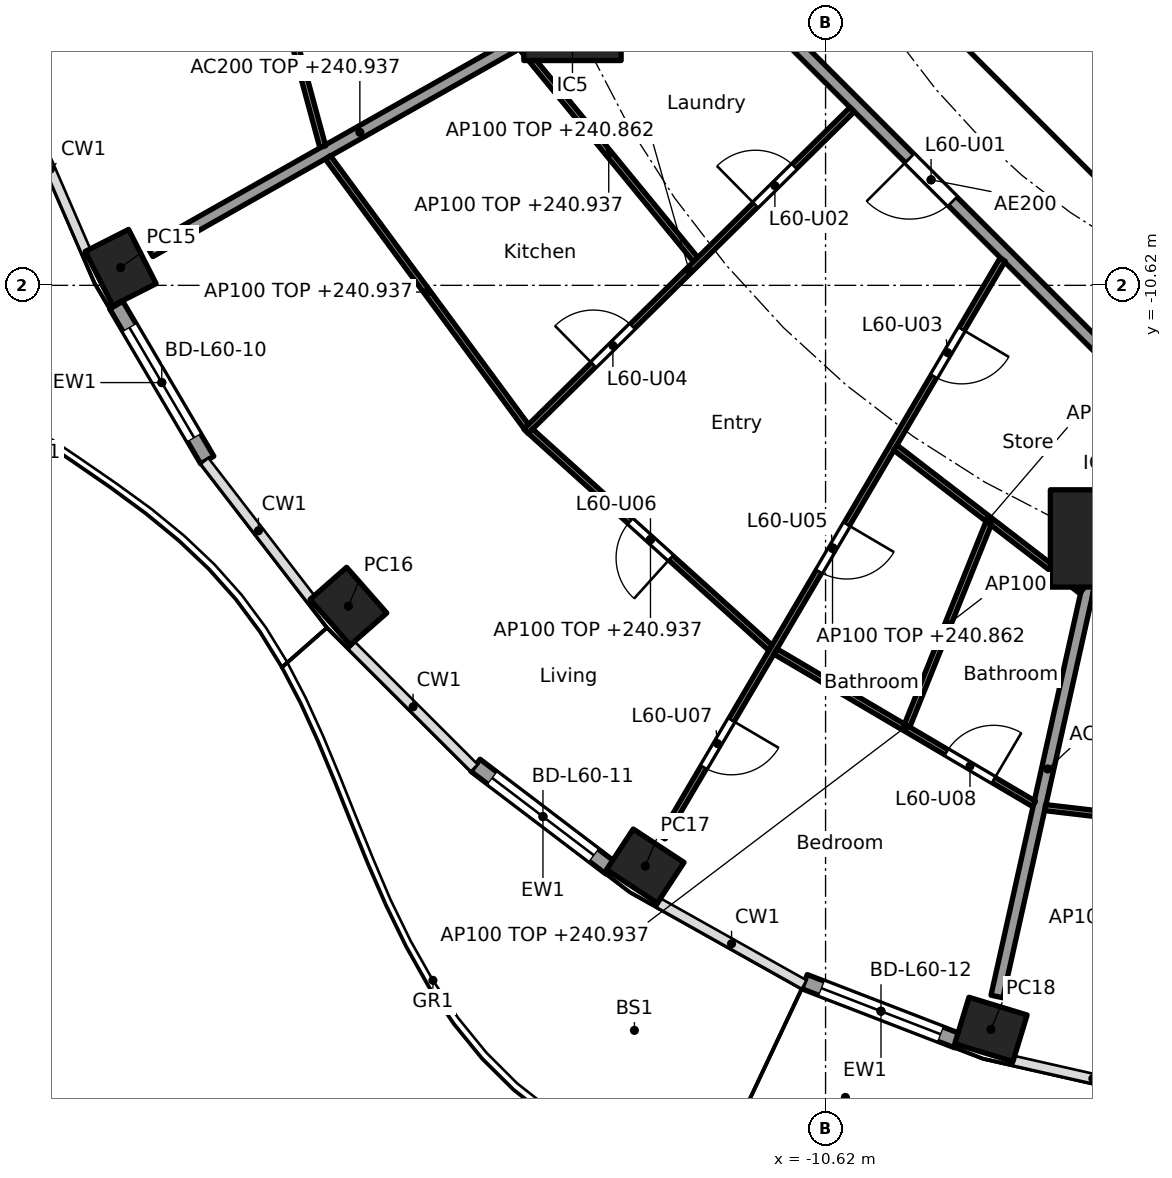
"""IFC4 building model, lengths in metres.
Left out: names, types, materials, properties, quantities, classifications, styles, units other than length and angle.
Written with IfcOpenShell. Run it as: python <this file> out.ifc"""

import sys

from ifc_helpers import new_model, si_unit, direction, frame, frame_2d, origin, origin_2d, place, context, subcontext, project, spatial, rectangle, hollow_rectangle, extrude, element, fill, save


model = new_model("IFC4")
c1 = context("Model", 3, precision=1e-05, world=origin(), true_north=direction((0.0, 1.0)))
c2 = subcontext(c1, "Body", "Model", "MODEL_VIEW")
j1 = project(units=[si_unit("LENGTHUNIT", "METRE"), si_unit("PLANEANGLEUNIT", "RADIAN")], contexts=[c1])
p1 = place(None, origin())
s1 = spatial("IfcSite", under=j1, at=p1, CompositionType="ELEMENT")
p2 = place(p1, origin())
s2 = spatial("IfcBuilding", under=s1, at=p2, CompositionType="ELEMENT")
p3 = place(p2, frame((0.0, 0.0, 238.1)))
s3 = spatial("IfcBuildingStorey", under=s2, at=p3, CompositionType="ELEMENT", Elevation=238.1)
for number, where, z_axis, x_axis in (
    (1, (-22.212, -10.327, 0.0), (0.0, 0.0, 1.0), (0.452, -0.892, 0.0)),
    (2, (-18.467, -15.896, 0.0), (0.0, 0.0, 1.0), (0.66, -0.751, 0.0)),
    (3, (-13.585, -20.17, 0.0), (0.0, 0.0, 1.0), (0.836, -0.549, 0.0)),
    (4, (-7.9, -22.856, 0.0), (0.0, 0.0, 1.0), (0.957, -0.292, 0.0)),
):
    element("IfcColumn", number, at=place(p3, frame(where, z_axis=z_axis, x_axis=x_axis)), inside=s3, PredefinedType="COLUMN", context=c2, shape_type="SweptSolid", body=[
        extrude(hollow_rectangle(XDim=1.0, YDim=0.8, WallThickness=0.032, at=origin_2d()), origin(), (0.0, 0.0, 1.0), 3.7),
    ])
for number, where, z_axis, x_axis in (
    (5, (-14.782, -6.123, 0.0), (0.0, 0.0, 1.0), (1.0, 0.0, 0.0)),
    (6, (-6.123, -14.782, 0.0), (0.0, 0.0, 1.0), (1.0, 0.0, 0.0)),
):
    element("IfcColumn", number, at=place(p3, frame(where, z_axis=z_axis, x_axis=x_axis)), inside=s3, PredefinedType="COLUMN", context=c2, shape_type="SweptSolid", body=[
        extrude(rectangle(XDim=1.6, YDim=1.6, at=origin_2d()), origin(), (0.0, 0.0, 1.0), 3.7),
    ])
p4 = place(p3, frame((-20.788, -13.493, 0.0), z_axis=(0.0, 0.0, 1.0), x_axis=(-0.506294090973, 0.862360883532, 0.0)))
e7 = element("IfcWall", 7, at=p4, inside=s3, PredefinedType="SOLIDWALL", context=c2, shape_type="SweptSolid", body=[
    extrude(rectangle(XDim=2.955, YDim=0.25, at=frame_2d((1.477, 0.0))), origin(), (0.0, 0.0, 1.0), 3.44),
])
p5 = place(p4, frame((0.427, 0.0, 0.0)))
e8 = element("IfcOpeningElement", 8, at=p5, cuts=e7, PredefinedType="OPENING", context=c2, shape_type="SweptSolid", body=[
    extrude(rectangle(XDim=2.1, YDim=2.4, at=frame_2d((1.05, 1.2))), frame((0.0, 0.135, 0.0), z_axis=(0.0, -1.0, 0.0), x_axis=(1.0, 0.0, 0.0)), (0.0, 0.0, 1.0), 0.27),
])
p6 = place(p3, frame((-14.157, -20.201, 0.0), z_axis=(0.0, 0.0, 1.0), x_axis=(-0.795990084031, 0.60530966135, 0.0)))
e9 = element("IfcWall", 9, at=p6, inside=s3, PredefinedType="SOLIDWALL", context=c2, shape_type="SweptSolid", body=[
    extrude(rectangle(XDim=2.789, YDim=0.25, at=frame_2d((1.394, 0.0))), origin(), (0.0, 0.0, 1.0), 3.44),
])
p7 = place(p6, frame((0.344, 0.0, 0.0)))
e10 = element("IfcOpeningElement", 10, at=p7, cuts=e9, PredefinedType="OPENING", context=c2, shape_type="SweptSolid", body=[
    extrude(rectangle(XDim=2.1, YDim=2.4, at=frame_2d((1.05, 1.2))), frame((0.0, 0.135, 0.0), z_axis=(0.0, -1.0, 0.0), x_axis=(1.0, 0.0, 0.0)), (0.0, 0.0, 1.0), 0.27),
])
p8 = place(p3, frame((-8.451, -23.042, 0.0), z_axis=(0.0, 0.0, 1.0), x_axis=(-0.932826499224, 0.360325855782, 0.0)))
e11 = element("IfcWall", 11, at=p8, inside=s3, PredefinedType="SOLIDWALL", context=c2, shape_type="SweptSolid", body=[
    extrude(rectangle(XDim=2.696, YDim=0.25, at=frame_2d((1.348, 0.0))), origin(), (0.0, 0.0, 1.0), 3.44),
])
p9 = place(p8, frame((0.298, 0.0, 0.0)))
e12 = element("IfcOpeningElement", 12, at=p9, cuts=e11, PredefinedType="OPENING", context=c2, shape_type="SweptSolid", body=[
    extrude(rectangle(XDim=2.1, YDim=2.4, at=frame_2d((1.05, 1.2))), frame((0.0, 0.135, 0.0), z_axis=(0.0, -1.0, 0.0), x_axis=(1.0, 0.0, 0.0)), (0.0, 0.0, 1.0), 0.27),
])
p10 = place(p3, frame((-9.988, -4.613, 0.0), z_axis=(0.0, 0.0, 1.0), x_axis=(0.707106781187, -0.707106781187, 0.0)))
e13 = element("IfcWall", 13, at=p10, inside=s3, PredefinedType="SHEAR", context=c2, shape_type="SweptSolid", body=[
    extrude(rectangle(XDim=7.602, YDim=0.6, at=frame_2d((3.801, 0.0))), origin(), (0.0, 0.0, 1.0), 3.44),
])
p11 = place(p10, frame((6.151, 0.0, 0.0)))
e14 = element("IfcOpeningElement", 14, at=p11, cuts=e13, PredefinedType="OPENING", context=c2, shape_type="SweptSolid", body=[
    extrude(rectangle(XDim=1.1, YDim=2.1, at=frame_2d((0.55, 1.05))), frame((0.0, 0.31, 0.0), z_axis=(0.0, -1.0, 0.0), x_axis=(1.0, 0.0, 0.0)), (0.0, 0.0, 1.0), 0.62),
])
p12 = place(p3, frame((-14.825, -6.148, 0.0), z_axis=(0.0, 0.0, 1.0), x_axis=(-0.870099576105, -0.492875975944, 0.0)))
e15 = element("IfcWall", 15, at=p12, inside=s3, PredefinedType="PARTITIONING", context=c2, shape_type="SweptSolid", body=[
    extrude(rectangle(XDim=7.937, YDim=0.2, at=frame_2d((3.969, 0.0))), origin(), (0.0, 0.0, 1.0), 2.837),
])
p13 = place(p3, frame((-6.134, -14.831, 0.0), z_axis=(0.0, 0.0, 1.0), x_axis=(-0.217500172543, -0.976060282433, 0.0)))
e16 = element("IfcWall", 16, at=p13, inside=s3, PredefinedType="PARTITIONING", context=c2, shape_type="SweptSolid", body=[
    extrude(rectangle(XDim=7.668, YDim=0.2, at=frame_2d((3.834, 0.0))), origin(), (0.0, 0.0, 1.0), 2.837),
])
p14 = place(p3, frame((-12.635, -5.134, 0.0), z_axis=(0.0, 0.0, 1.0), x_axis=(0.707106781187, -0.707106781187, 0.0)))
e17 = element("IfcWall", 17, at=p14, inside=s3, PredefinedType="PARTITIONING", context=c2, shape_type="SweptSolid", body=[
    extrude(rectangle(XDim=10.609, YDim=0.2, at=frame_2d((5.305, 0.0))), origin(), (0.0, 0.0, 1.0), 3.44),
])
p15 = place(p14, frame((4.804, 0.0, 0.0)))
e18 = element("IfcOpeningElement", 18, at=p15, cuts=e17, PredefinedType="OPENING", context=c2, shape_type="SweptSolid", body=[
    extrude(rectangle(XDim=1.0, YDim=2.1, at=frame_2d((0.5, 1.05))), frame((0.0, 0.11, 0.0), z_axis=(0.0, -1.0, 0.0), x_axis=(1.0, 0.0, 0.0)), (0.0, 0.0, 1.0), 0.22),
])
p16 = place(p3, frame((-20.292, -3.17, 0.0), z_axis=(0.0, 0.0, 1.0), x_axis=(0.26187906236, -0.965100697698, 0.0)))
e19 = element("IfcWall", 19, at=p16, inside=s3, PredefinedType="PARTITIONING", context=c2, shape_type="SweptSolid", body=[
    extrude(rectangle(XDim=5.356, YDim=0.1, at=frame_2d((2.678, 0.0))), origin(), (0.0, 0.0, 1.0), 2.837),
])
p17 = place(p16, frame((2.228, 0.0, 0.0)))
e20 = element("IfcOpeningElement", 20, at=p17, cuts=e19, PredefinedType="OPENING", context=c2, shape_type="SweptSolid", body=[
    extrude(rectangle(XDim=0.9, YDim=2.1, at=frame_2d((0.45, 1.05))), frame((0.0, 0.06, 0.0), z_axis=(0.0, -1.0, 0.0), x_axis=(1.0, 0.0, 0.0)), (0.0, 0.0, 1.0), 0.12),
])
p18 = place(p3, frame((-15.616, -6.708, 0.0), z_axis=(0.0, 0.0, 1.0), x_axis=(0.634074410447, -0.77327203623, 0.0)))
e21 = element("IfcWall", 21, at=p18, inside=s3, PredefinedType="PARTITIONING", context=c2, shape_type="SweptSolid", body=[
    extrude(rectangle(XDim=4.511, YDim=0.1, at=frame_2d((2.255, 0.0))), origin(), (0.0, 0.0, 1.0), 2.837),
])
p19 = place(p3, frame((-18.804, -8.516, 0.0), z_axis=(0.0, 0.0, 1.0), x_axis=(0.593233851441, -0.80503018422, 0.0)))
e22 = element("IfcWall", 22, at=p19, inside=s3, PredefinedType="PARTITIONING", context=c2, shape_type="SweptSolid", body=[
    extrude(rectangle(XDim=5.502, YDim=0.1, at=frame_2d((2.751, 0.0))), origin(), (0.0, 0.0, 1.0), 2.837),
])
p20 = place(p3, frame((-10.183, -7.728, 0.0), z_axis=(0.0, 0.0, 1.0), x_axis=(-0.711869910979, -0.702311348223, 0.0)))
e23 = element("IfcWall", 23, at=p20, inside=s3, PredefinedType="PARTITIONING", context=c2, shape_type="SweptSolid", body=[
    extrude(rectangle(XDim=7.535, YDim=0.1, at=frame_2d((3.767, 0.0))), origin(), (0.0, 0.0, 1.0), 2.762),
])
p21 = place(p20, frame((1.335, 0.0, 0.0)))
e24 = element("IfcOpeningElement", 24, at=p21, cuts=e23, PredefinedType="OPENING", context=c2, shape_type="SweptSolid", body=[
    extrude(rectangle(XDim=0.9, YDim=2.1, at=frame_2d((0.45, 1.05))), frame((0.0, 0.06, 0.0), z_axis=(0.0, -1.0, 0.0), x_axis=(1.0, 0.0, 0.0)), (0.0, 0.0, 1.0), 0.12),
])
p22 = place(p20, frame((5.077, 0.0, 0.0)))
e25 = element("IfcOpeningElement", 25, at=p22, cuts=e23, PredefinedType="OPENING", context=c2, shape_type="SweptSolid", body=[
    extrude(rectangle(XDim=0.9, YDim=2.1, at=frame_2d((0.45, 1.05))), frame((0.0, 0.06, 0.0), z_axis=(0.0, -1.0, 0.0), x_axis=(1.0, 0.0, 0.0)), (0.0, 0.0, 1.0), 0.12),
])
p23 = place(p3, frame((-15.474, -13.019, 0.0), z_axis=(0.0, 0.0, 1.0), x_axis=(0.742348572616, -0.670013878017, 0.0)))
e26 = element("IfcWall", 26, at=p23, inside=s3, PredefinedType="PARTITIONING", context=c2, shape_type="SweptSolid", body=[
    extrude(rectangle(XDim=5.319, YDim=0.1, at=frame_2d((2.66, 0.0))), origin(), (0.0, 0.0, 1.0), 2.837),
])
p24 = place(p23, frame((2.21, 0.0, 0.0)))
e27 = element("IfcOpeningElement", 27, at=p24, cuts=e26, PredefinedType="OPENING", context=c2, shape_type="SweptSolid", body=[
    extrude(rectangle(XDim=0.9, YDim=2.1, at=frame_2d((0.45, 1.05))), frame((0.0, 0.06, 0.0), z_axis=(0.0, -1.0, 0.0), x_axis=(1.0, 0.0, 0.0)), (0.0, 0.0, 1.0), 0.12),
])
p25 = place(p3, frame((-7.709, -10.198, 0.0), z_axis=(0.0, 0.0, 1.0), x_axis=(-0.507355901053, -0.8617366127, 0.0)))
e28 = element("IfcWall", 28, at=p25, inside=s3, PredefinedType="PARTITIONING", context=c2, shape_type="SweptSolid", body=[
    extrude(rectangle(XDim=11.025, YDim=0.1, at=frame_2d((5.512, 0.0))), origin(), (0.0, 0.0, 1.0), 2.762),
])
p26 = place(p25, frame((1.326, 0.0, 0.0)))
e29 = element("IfcOpeningElement", 29, at=p26, cuts=e28, PredefinedType="OPENING", context=c2, shape_type="SweptSolid", body=[
    extrude(rectangle(XDim=0.9, YDim=2.1, at=frame_2d((0.45, 1.05))), frame((0.0, 0.06, 0.0), z_axis=(0.0, -1.0, 0.0), x_axis=(1.0, 0.0, 0.0)), (0.0, 0.0, 1.0), 0.12),
])
p27 = place(p25, frame((5.05, 0.0, 0.0)))
e30 = element("IfcOpeningElement", 30, at=p27, cuts=e28, PredefinedType="OPENING", context=c2, shape_type="SweptSolid", body=[
    extrude(rectangle(XDim=0.9, YDim=2.1, at=frame_2d((0.45, 1.05))), frame((0.0, 0.06, 0.0), z_axis=(0.0, -1.0, 0.0), x_axis=(1.0, 0.0, 0.0)), (0.0, 0.0, 1.0), 0.12),
])
p28 = place(p25, frame((8.787, 0.0, 0.0)))
e31 = element("IfcOpeningElement", 31, at=p28, cuts=e28, PredefinedType="OPENING", context=c2, shape_type="SweptSolid", body=[
    extrude(rectangle(XDim=0.9, YDim=2.1, at=frame_2d((0.45, 1.05))), frame((0.0, 0.06, 0.0), z_axis=(0.0, -1.0, 0.0), x_axis=(1.0, 0.0, 0.0)), (0.0, 0.0, 1.0), 0.12),
])
p29 = place(p3, frame((-9.471, -13.289, 0.0), z_axis=(0.0, 0.0, 1.0), x_axis=(0.792227074489, -0.610226402614, 0.0)))
e32 = element("IfcWall", 32, at=p29, inside=s3, PredefinedType="PARTITIONING", context=c2, shape_type="SweptSolid", body=[
    extrude(rectangle(XDim=3.866, YDim=0.1, at=frame_2d((1.933, 0.0))), origin(), (0.0, 0.0, 1.0), 2.837),
])
p30 = place(p3, frame((-11.445, -16.641, 0.0), z_axis=(0.0, 0.0, 1.0), x_axis=(0.861568986754, -0.507640503766, 0.0)))
e33 = element("IfcWall", 33, at=p30, inside=s3, PredefinedType="PARTITIONING", context=c2, shape_type="SweptSolid", body=[
    extrude(rectangle(XDim=4.935, YDim=0.1, at=frame_2d((2.467, 0.0))), origin(), (0.0, 0.0, 1.0), 2.837),
])
p31 = place(p30, frame((3.264, 0.0, 0.0)))
e34 = element("IfcOpeningElement", 34, at=p31, cuts=e33, PredefinedType="OPENING", context=c2, shape_type="SweptSolid", body=[
    extrude(rectangle(XDim=0.9, YDim=2.1, at=frame_2d((0.45, 1.05))), frame((0.0, 0.06, 0.0), z_axis=(0.0, -1.0, 0.0), x_axis=(1.0, 0.0, 0.0)), (0.0, 0.0, 1.0), 0.12),
])
p32 = place(p3, frame((-7.939, -14.531, 0.0), z_axis=(0.0, 0.0, 1.0), x_axis=(-0.373254758443, -0.927728885666, 0.0)))
e35 = element("IfcWall", 35, at=p32, inside=s3, PredefinedType="PARTITIONING", context=c2, shape_type="SweptSolid", body=[
    extrude(rectangle(XDim=3.589, YDim=0.1, at=frame_2d((1.794, 0.0))), origin(), (0.0, 0.0, 1.0), 3.44),
])
p33 = place(p3, frame((-6.23, -15.717, 0.0), z_axis=(0.0, 0.0, 1.0), x_axis=(0.996784770134, -0.080125663978, 0.0)))
e36 = element("IfcWall", 36, at=p33, inside=s3, PredefinedType="PARTITIONING", context=c2, shape_type="SweptSolid", body=[
    extrude(rectangle(XDim=4.54, YDim=0.1, at=frame_2d((2.27, 0.0))), origin(), (0.0, 0.0, 1.0), 2.837),
])
p34 = place(p33, frame((1.795, 0.0, 0.0)))
e37 = element("IfcOpeningElement", 37, at=p34, cuts=e36, PredefinedType="OPENING", context=c2, shape_type="SweptSolid", body=[
    extrude(rectangle(XDim=0.9, YDim=2.1, at=frame_2d((0.45, 1.05))), frame((0.0, 0.06, 0.0), z_axis=(0.0, -1.0, 0.0), x_axis=(1.0, 0.0, 0.0)), (0.0, 0.0, 1.0), 0.12),
])
p35 = place(p3, frame((-7.008, -19.209, 0.0), z_axis=(0.0, 0.0, 1.0), x_axis=(0.993173459887, -0.116646811258, 0.0)))
e38 = element("IfcWall", 38, at=p35, inside=s3, PredefinedType="PARTITIONING", context=c2, shape_type="SweptSolid", body=[
    extrude(rectangle(XDim=5.318, YDim=0.1, at=frame_2d((2.659, 0.0))), origin(), (0.0, 0.0, 1.0), 2.837),
])
p36 = place(p35, frame((2.184, 0.0, 0.0)))
e39 = element("IfcOpeningElement", 39, at=p36, cuts=e38, PredefinedType="OPENING", context=c2, shape_type="SweptSolid", body=[
    extrude(rectangle(XDim=0.9, YDim=2.1, at=frame_2d((0.45, 1.05))), frame((0.0, 0.06, 0.0), z_axis=(0.0, -1.0, 0.0), x_axis=(1.0, 0.0, 0.0)), (0.0, 0.0, 1.0), 0.12),
])
p37 = place(p5, origin())
e40 = element("IfcDoor", 40, at=p37, inside=s3, OperationType="SLIDING_TO_LEFT", PredefinedType="DOOR", context=c2, shape_type="SweptSolid", body=[
    extrude(rectangle(XDim=2.1, YDim=2.4, at=frame_2d((1.05, 1.2))), frame((0.0, 0.025, 0.0), z_axis=(0.0, -1.0, 0.0), x_axis=(1.0, 0.0, 0.0)), (0.0, 0.0, 1.0), 0.05),
])
fill(e8, e40)
p38 = place(p7, origin())
e41 = element("IfcDoor", 41, at=p38, inside=s3, OperationType="SLIDING_TO_LEFT", PredefinedType="DOOR", context=c2, shape_type="SweptSolid", body=[
    extrude(rectangle(XDim=2.1, YDim=2.4, at=frame_2d((1.05, 1.2))), frame((0.0, 0.025, 0.0), z_axis=(0.0, -1.0, 0.0), x_axis=(1.0, 0.0, 0.0)), (0.0, 0.0, 1.0), 0.05),
])
fill(e10, e41)
p39 = place(p9, origin())
e42 = element("IfcDoor", 42, at=p39, inside=s3, OperationType="SLIDING_TO_LEFT", PredefinedType="DOOR", context=c2, shape_type="SweptSolid", body=[
    extrude(rectangle(XDim=2.1, YDim=2.4, at=frame_2d((1.05, 1.2))), frame((0.0, 0.025, 0.0), z_axis=(0.0, -1.0, 0.0), x_axis=(1.0, 0.0, 0.0)), (0.0, 0.0, 1.0), 0.05),
])
fill(e12, e42)
p40 = place(p15, frame((1.0, 0.0, 0.0), x_axis=(-1.0, 0.0, 0.0)))
e43 = element("IfcDoor", 43, at=p40, inside=s3, OperationType="SINGLE_SWING_RIGHT", PredefinedType="DOOR", context=c2, shape_type="SweptSolid", body=[
    extrude(rectangle(XDim=1.0, YDim=2.1, at=frame_2d((0.5, 1.05))), frame((0.0, 0.025, 0.0), z_axis=(0.0, -1.0, 0.0), x_axis=(1.0, 0.0, 0.0)), (0.0, 0.0, 1.0), 0.05),
])
fill(e18, e43)
p41 = place(p21, frame((0.9, 0.0, 0.0), x_axis=(-1.0, 0.0, 0.0)))
e44 = element("IfcDoor", 44, at=p41, inside=s3, OperationType="SINGLE_SWING_LEFT", PredefinedType="DOOR", context=c2, shape_type="SweptSolid", body=[
    extrude(rectangle(XDim=0.9, YDim=2.1, at=frame_2d((0.45, 1.05))), frame((0.0, 0.025, 0.0), z_axis=(0.0, -1.0, 0.0), x_axis=(1.0, 0.0, 0.0)), (0.0, 0.0, 1.0), 0.05),
])
fill(e24, e44)
p42 = place(p26, origin())
e45 = element("IfcDoor", 45, at=p42, inside=s3, OperationType="SINGLE_SWING_LEFT", PredefinedType="DOOR", context=c2, shape_type="SweptSolid", body=[
    extrude(rectangle(XDim=0.9, YDim=2.1, at=frame_2d((0.45, 1.05))), frame((0.0, 0.025, 0.0), z_axis=(0.0, -1.0, 0.0), x_axis=(1.0, 0.0, 0.0)), (0.0, 0.0, 1.0), 0.05),
])
fill(e29, e45)
p43 = place(p22, frame((0.9, 0.0, 0.0), x_axis=(-1.0, 0.0, 0.0)))
e46 = element("IfcDoor", 46, at=p43, inside=s3, OperationType="SINGLE_SWING_LEFT", PredefinedType="DOOR", context=c2, shape_type="SweptSolid", body=[
    extrude(rectangle(XDim=0.9, YDim=2.1, at=frame_2d((0.45, 1.05))), frame((0.0, 0.025, 0.0), z_axis=(0.0, -1.0, 0.0), x_axis=(1.0, 0.0, 0.0)), (0.0, 0.0, 1.0), 0.05),
])
fill(e25, e46)
p44 = place(p27, origin())
e47 = element("IfcDoor", 47, at=p44, inside=s3, OperationType="SINGLE_SWING_LEFT", PredefinedType="DOOR", context=c2, shape_type="SweptSolid", body=[
    extrude(rectangle(XDim=0.9, YDim=2.1, at=frame_2d((0.45, 1.05))), frame((0.0, 0.025, 0.0), z_axis=(0.0, -1.0, 0.0), x_axis=(1.0, 0.0, 0.0)), (0.0, 0.0, 1.0), 0.05),
])
fill(e30, e47)
p45 = place(p24, frame((0.9, 0.0, 0.0), x_axis=(-1.0, 0.0, 0.0)))
e48 = element("IfcDoor", 48, at=p45, inside=s3, OperationType="SINGLE_SWING_LEFT", PredefinedType="DOOR", context=c2, shape_type="SweptSolid", body=[
    extrude(rectangle(XDim=0.9, YDim=2.1, at=frame_2d((0.45, 1.05))), frame((0.0, 0.025, 0.0), z_axis=(0.0, -1.0, 0.0), x_axis=(1.0, 0.0, 0.0)), (0.0, 0.0, 1.0), 0.05),
])
fill(e27, e48)
p46 = place(p28, origin())
e49 = element("IfcDoor", 49, at=p46, inside=s3, OperationType="SINGLE_SWING_LEFT", PredefinedType="DOOR", context=c2, shape_type="SweptSolid", body=[
    extrude(rectangle(XDim=0.9, YDim=2.1, at=frame_2d((0.45, 1.05))), frame((0.0, 0.025, 0.0), z_axis=(0.0, -1.0, 0.0), x_axis=(1.0, 0.0, 0.0)), (0.0, 0.0, 1.0), 0.05),
])
fill(e31, e49)
p47 = place(p31, origin())
e50 = element("IfcDoor", 50, at=p47, inside=s3, OperationType="SINGLE_SWING_RIGHT", PredefinedType="DOOR", context=c2, shape_type="SweptSolid", body=[
    extrude(rectangle(XDim=0.9, YDim=2.1, at=frame_2d((0.45, 1.05))), frame((0.0, 0.025, 0.0), z_axis=(0.0, -1.0, 0.0), x_axis=(1.0, 0.0, 0.0)), (0.0, 0.0, 1.0), 0.05),
])
fill(e34, e50)
save(model, sys.argv[1])
